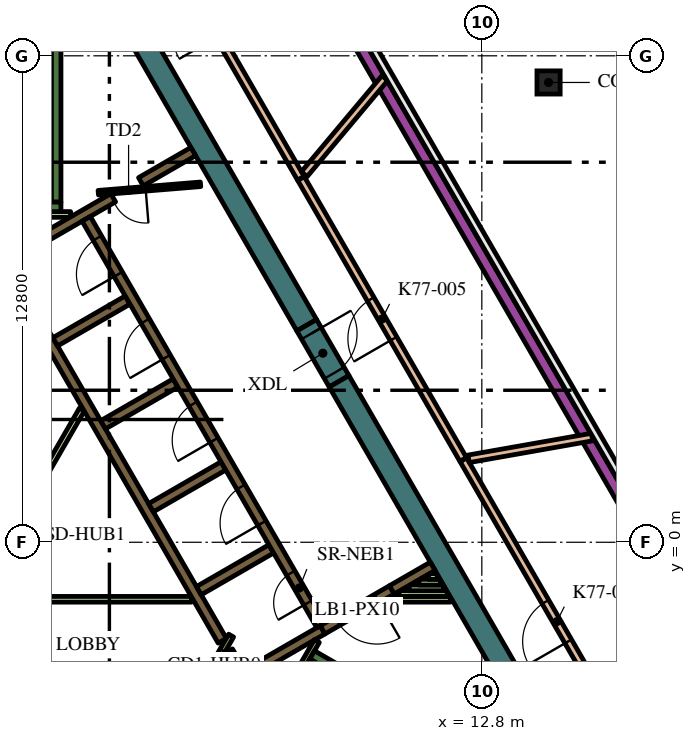
"""IFC4 building model, lengths in metres.
Left out: names, types, materials, properties, quantities, classifications, styles, units other than length and angle.
Written with IfcOpenShell. Run it as: python <this file> out.ifc"""

import sys

from ifc_helpers import new_model, si_unit, direction, frame, frame_2d, origin, origin_2d, place, context, subcontext, project, spatial, rectangle, hollow_circle, extrude, element, fill, save


model = new_model("IFC4")
c1 = context("Model", 3, precision=1e-05, world=origin(), true_north=direction((0.0, 1.0)))
c2 = subcontext(c1, "Body", "Model", "MODEL_VIEW")
j1 = project(units=[si_unit("LENGTHUNIT", "METRE"), si_unit("PLANEANGLEUNIT", "RADIAN")], contexts=[c1])
p1 = place(None, origin())
s1 = spatial("IfcSite", under=j1, at=p1, CompositionType="ELEMENT")
p2 = place(p1, origin())
s2 = spatial("IfcBuilding", under=s1, at=p2, CompositionType="ELEMENT")
p3 = place(p2, frame((0.0, 0.0, 331.8)))
s3 = spatial("IfcBuildingStorey", under=s2, at=p3, CompositionType="ELEMENT", Elevation=331.8)
p4 = place(p3, frame((14.556, 12.098, 0.0), z_axis=(0.0, 0.0, 1.0), x_axis=(1.0, 0.0, 0.0)))
e1 = element("IfcColumn", 1, at=p4, inside=s3, PredefinedType="COLUMN", context=c2, shape_type="SweptSolid", body=[
    extrude(hollow_circle(Radius=0.305, WallThickness=0.025, at=origin_2d()), origin(), (0.0, 0.0, 1.0), 4.2),
])
for number, where, z_axis, x_axis in (
    (2, (9.042, 4.239, 0.0), (0.0, 0.0, 1.0), (0.5, -0.866, 0.0)),
    (3, (1.989, 16.456, 0.0), (0.0, 0.0, 1.0), (0.5, -0.866, 0.0)),
):
    element("IfcWall", number, at=place(p3, frame(where, z_axis=z_axis, x_axis=x_axis)), inside=s3, PredefinedType="SOLIDWALL", context=c2, shape_type="SweptSolid", body=[
        extrude(rectangle(XDim=12.406, YDim=0.6, at=frame_2d((6.203, 0.0))), origin(), (0.0, 0.0, 1.0), 4.2),
    ])
p5 = place(p3, frame((8.334, -2.964, 0.0), z_axis=(0.0, 0.0, 1.0), x_axis=(0.866016039709, -0.500016218704, 0.0)))
e4 = element("IfcWall", 4, at=p5, inside=s3, PredefinedType="SOLIDWALL", context=c2, shape_type="SweptSolid", body=[
    extrude(rectangle(XDim=7.05, YDim=0.25, at=frame_2d((3.525, 0.0))), origin(), (0.0, 0.0, 1.0), 4.2),
])
p6 = place(p3, frame((8.168, -3.503, 0.0), z_axis=(0.0, 0.0, 1.0), x_axis=(0.49972245349, 0.866185586049, 0.0)))
e5 = element("IfcWall", 5, at=p6, inside=s3, PredefinedType="SOLIDWALL", context=c2, shape_type="SweptSolid", body=[
    extrude(rectangle(XDim=0.425, YDim=0.25, at=frame_2d((0.212, 0.0))), origin(), (0.0, 0.0, 1.0), 4.2),
])
p7 = place(p3, frame((1.6, 8.95, 0.0), z_axis=(0.0, 0.0, 1.0), x_axis=(0.0, 1.0, 0.0)))
e6 = element("IfcWall", 6, at=p7, inside=s3, PredefinedType="SOLIDWALL", context=c2, shape_type="SweptSolid", body=[
    extrude(rectangle(XDim=6.8, YDim=0.25, at=frame_2d((3.4, 0.0))), origin(), (0.0, 0.0, 1.0), 4.2),
])
p8 = place(p3, frame((1.05, 8.825, 0.0), z_axis=(0.0, 0.0, 1.0), x_axis=(1.0, 0.0, 0.0)))
e7 = element("IfcWall", 7, at=p8, inside=s3, PredefinedType="SOLIDWALL", context=c2, shape_type="SweptSolid", body=[
    extrude(rectangle(XDim=0.675, YDim=0.25, at=frame_2d((0.337, 0.0))), origin(), (0.0, 0.0, 1.0), 4.2),
])
p9 = place(p3, frame((8.61, -2.303, 0.0), z_axis=(0.0, 0.0, 1.0), x_axis=(-0.866056864386, -0.49994550468, 0.0)))
e8 = element("IfcWall", 8, at=p9, inside=s3, PredefinedType="SOLIDWALL", context=c2, shape_type="SweptSolid", body=[
    extrude(rectangle(XDim=2.621, YDim=0.25, at=frame_2d((1.311, 0.0))), origin(), (0.0, 0.0, 1.0), 4.2),
])
p10 = place(p3, frame((6.13, -2.867, 0.0), z_axis=(0.0, 0.0, 1.0), x_axis=(0.500160776593, -0.865932559475, 0.0)))
e9 = element("IfcWall", 9, at=p10, inside=s3, PredefinedType="SOLIDWALL", context=c2, shape_type="SweptSolid", body=[
    extrude(rectangle(XDim=0.627, YDim=0.25, at=frame_2d((0.313, 0.0))), origin(), (0.0, 0.0, 1.0), 4.2),
])
p11 = place(p3, frame((11.507, -0.631, 0.0), z_axis=(0.0, 0.0, 1.0), x_axis=(-0.866025525965, -0.499999788377, 0.0)))
e10 = element("IfcWall", 10, at=p11, inside=s3, PredefinedType="SOLIDWALL", context=c2, shape_type="SweptSolid", body=[
    extrude(rectangle(XDim=1.245, YDim=0.25, at=frame_2d((0.622, 0.0))), origin(), (0.0, 0.0, 1.0), 4.2),
])
p12 = place(p3, frame((3.1, 9.064, 0.0), z_axis=(0.0, 0.0, 1.0), x_axis=(-0.866033137035, -0.499986605379, 0.0)))
e11 = element("IfcWall", 11, at=p12, inside=s3, PredefinedType="SOLIDWALL", context=c2, shape_type="SweptSolid", body=[
    extrude(rectangle(XDim=3.467, YDim=0.25, at=frame_2d((1.733, 0.0))), origin(), (0.0, 0.0, 1.0), 4.2),
])
p13 = place(p3, frame((5.97, -2.591, 0.0), z_axis=(0.0, 0.0, 1.0), x_axis=(-0.499994469932, 0.866028596547, 0.0)))
e12 = element("IfcWall", 12, at=p13, inside=s3, PredefinedType="SOLIDWALL", context=c2, shape_type="SweptSolid", body=[
    extrude(rectangle(XDim=10.488, YDim=0.25, at=frame_2d((5.244, 0.0))), origin(), (0.0, 0.0, 1.0), 4.2),
])
p14 = place(p3, frame((1.574, 5.274, 0.0), z_axis=(0.0, 0.0, 1.0), x_axis=(0.866028486751, 0.499994660107, 0.0)))
e13 = element("IfcWall", 13, at=p14, inside=s3, PredefinedType="SOLIDWALL", context=c2, shape_type="SweptSolid", body=[
    extrude(rectangle(XDim=2.2, YDim=0.25, at=frame_2d((1.1, 0.0))), origin(), (0.0, 0.0, 1.0), 4.2),
])
for number, where, z_axis, x_axis in (
    (14, (2.834, 3.091, 0.0), (0.0, 0.0, 1.0), (0.866, 0.5, 0.0)),
    (15, (4.094, 0.909, 0.0), (0.0, 0.0, 1.0), (0.866, 0.5, 0.0)),
    (16, (5.354, -1.274, 0.0), (0.0, 0.0, 1.0), (0.866, 0.5, 0.0)),
):
    element("IfcWall", number, at=place(p3, frame(where, z_axis=z_axis, x_axis=x_axis)), inside=s3, PredefinedType="SOLIDWALL", context=c2, shape_type="SweptSolid", body=[
        extrude(rectangle(XDim=2.2, YDim=0.25, at=frame_2d((1.1, 0.0))), origin(), (0.0, 0.0, 1.0), 4.2),
    ])
p15 = place(p3, frame((3.83, 9.486, 0.0), z_axis=(0.0, 0.0, 1.0), x_axis=(0.865986202621, 0.500067892261, 0.0)))
e17 = element("IfcWall", 17, at=p15, inside=s3, PredefinedType="SOLIDWALL", context=c2, shape_type="SweptSolid", body=[
    extrude(rectangle(XDim=1.591, YDim=0.25, at=frame_2d((0.795, 0.0))), origin(), (0.0, 0.0, 1.0), 4.2),
])
p16 = place(p3, frame((1.05, 8.625, 0.0), z_axis=(0.0, 0.0, 1.0), x_axis=(1.0, 0.0, 0.0)))
e18 = element("IfcWall", 18, at=p16, inside=s3, PredefinedType="PARTITIONING", context=c2, shape_type="SweptSolid", body=[
    extrude(rectangle(XDim=0.929, YDim=0.15, at=frame_2d((0.464, 0.0))), origin(), (0.0, 0.0, 1.0), 3.45),
])
p17 = place(p3, frame((10.362, -1.5, 0.0), z_axis=(0.0, 0.0, 1.0), x_axis=(1.0, 0.0, 0.0)))
e19 = element("IfcWall", 19, at=p17, inside=s3, PredefinedType="PARTITIONING", context=c2, shape_type="SweptSolid", body=[
    extrude(rectangle(XDim=1.61, YDim=0.15, at=frame_2d((0.805, 0.0))), origin(), (0.0, 0.0, 1.0), 3.45),
])
p18 = place(p3, frame((10.622, -1.35, 0.0), z_axis=(0.0, 0.0, 1.0), x_axis=(1.0, 0.0, 0.0)))
e20 = element("IfcWall", 20, at=p18, inside=s3, PredefinedType="PARTITIONING", context=c2, shape_type="SweptSolid", body=[
    extrude(rectangle(XDim=1.263, YDim=0.15, at=frame_2d((0.632, 0.0))), origin(), (0.0, 0.0, 1.0), 3.45),
])
p19 = place(p3, frame((10.882, -1.2, 0.0), z_axis=(0.0, 0.0, 1.0), x_axis=(1.0, 0.0, 0.0)))
e21 = element("IfcWall", 21, at=p19, inside=s3, PredefinedType="PARTITIONING", context=c2, shape_type="SweptSolid", body=[
    extrude(rectangle(XDim=0.917, YDim=0.15, at=frame_2d((0.459, 0.0))), origin(), (0.0, 0.0, 1.0), 3.45),
])
p20 = place(p3, frame((11.712, -1.05, 0.0), z_axis=(0.0, 0.0, 1.0), x_axis=(-1.0, 0.0, 0.0)))
e22 = element("IfcWall", 22, at=p20, inside=s3, PredefinedType="PARTITIONING", context=c2, shape_type="SweptSolid", body=[
    extrude(rectangle(XDim=0.571, YDim=0.15, at=frame_2d((0.285, 0.0))), origin(), (0.0, 0.0, 1.0), 3.45),
])
p21 = place(p3, frame((11.401, -0.9, 0.0), z_axis=(0.0, 0.0, 1.0), x_axis=(1.0, 0.0, 0.0)))
e23 = element("IfcWall", 23, at=p21, inside=s3, PredefinedType="PARTITIONING", context=c2, shape_type="SweptSolid", body=[
    extrude(rectangle(XDim=0.224, YDim=0.15, at=frame_2d((0.112, 0.0))), origin(), (0.0, 0.0, 1.0), 3.45),
])
p22 = place(p3, frame((8.459, -2.599, 0.0), z_axis=(0.0, 0.0, 1.0), x_axis=(-0.500041054325, -0.866001699761, 0.0)))
e24 = element("IfcWall", 24, at=p22, inside=s3, PredefinedType="PARTITIONING", context=c2, shape_type="SweptSolid", body=[
    extrude(rectangle(XDim=0.929, YDim=0.15, at=frame_2d((0.464, 0.0))), origin(), (0.0, 0.0, 1.0), 4.2),
])
p23 = place(p3, frame((-4.2, -1.5, 0.0), z_axis=(0.0, 0.0, 1.0), x_axis=(1.0, 0.0, 0.0)))
e25 = element("IfcWall", 25, at=p23, inside=s3, PredefinedType="PARTITIONING", context=c2, shape_type="SweptSolid", body=[
    extrude(rectangle(XDim=9.359, YDim=0.15, at=frame_2d((4.68, 0.0))), origin(), (0.0, 0.0, 1.0), 3.45),
])
p24 = place(p3, frame((1.312, 1.822, 0.0), z_axis=(0.0, 0.0, 1.0), x_axis=(0.500003549559, 0.866023354436, 0.0)))
e26 = element("IfcWall", 26, at=p24, inside=s3, PredefinedType="PARTITIONING", context=c2, shape_type="SweptSolid", body=[
    extrude(rectangle(XDim=1.93, YDim=0.15, at=frame_2d((0.965, 0.0))), origin(), (0.0, 0.0, 1.0), 3.45),
])
p25 = place(p3, frame((8.565, -2.185, 0.0), z_axis=(0.0, 0.0, 1.0), x_axis=(-0.499997954832, 0.866026584559, 0.0)))
e27 = element("IfcWall", 27, at=p25, inside=s3, PredefinedType="SOLIDWALL", context=c2, shape_type="SweptSolid", body=[
    extrude(rectangle(XDim=12.35, YDim=0.25, at=frame_2d((6.175, 0.0))), origin(), (0.0, 0.0, 1.0), 4.2),
])
p26 = place(p25, frame((0.685, 0.0, 0.0)))
e28 = element("IfcOpeningElement", 28, at=p26, cuts=e27, PredefinedType="OPENING", context=c2, shape_type="SweptSolid", body=[
    extrude(rectangle(XDim=0.9, YDim=2.1, at=frame_2d((0.45, 1.05))), frame((0.0, 0.135, 0.0), z_axis=(0.0, -1.0, 0.0), x_axis=(1.0, 0.0, 0.0)), (0.0, 0.0, 1.0), 0.27),
])
p27 = place(p25, frame((3.105, 0.0, 0.0)))
e29 = element("IfcOpeningElement", 29, at=p27, cuts=e27, PredefinedType="OPENING", context=c2, shape_type="SweptSolid", body=[
    extrude(rectangle(XDim=1.1, YDim=2.1, at=frame_2d((0.55, 1.05))), frame((0.0, 0.135, 0.0), z_axis=(0.0, -1.0, 0.0), x_axis=(1.0, 0.0, 0.0)), (0.0, 0.0, 1.0), 0.27),
])
p28 = place(p25, frame((5.625, 0.0, 0.0)))
e30 = element("IfcOpeningElement", 30, at=p28, cuts=e27, PredefinedType="OPENING", context=c2, shape_type="SweptSolid", body=[
    extrude(rectangle(XDim=1.1, YDim=2.1, at=frame_2d((0.55, 1.05))), frame((0.0, 0.135, 0.0), z_axis=(0.0, -1.0, 0.0), x_axis=(1.0, 0.0, 0.0)), (0.0, 0.0, 1.0), 0.27),
])
p29 = place(p25, frame((8.145, 0.0, 0.0)))
e31 = element("IfcOpeningElement", 31, at=p29, cuts=e27, PredefinedType="OPENING", context=c2, shape_type="SweptSolid", body=[
    extrude(rectangle(XDim=1.1, YDim=2.1, at=frame_2d((0.55, 1.05))), frame((0.0, 0.135, 0.0), z_axis=(0.0, -1.0, 0.0), x_axis=(1.0, 0.0, 0.0)), (0.0, 0.0, 1.0), 0.27),
])
p30 = place(p25, frame((10.665, 0.0, 0.0)))
e32 = element("IfcOpeningElement", 32, at=p30, cuts=e27, PredefinedType="OPENING", context=c2, shape_type="SweptSolid", body=[
    extrude(rectangle(XDim=1.1, YDim=2.1, at=frame_2d((0.55, 1.05))), frame((0.0, 0.135, 0.0), z_axis=(0.0, -1.0, 0.0), x_axis=(1.0, 0.0, 0.0)), (0.0, 0.0, 1.0), 0.27),
])
p31 = place(p3, frame((5.398, 9.419, 0.0), z_axis=(0.0, 0.0, 1.0), x_axis=(-0.996653416376, -0.081743303248, 0.0)))
e33 = element("IfcWall", 33, at=p31, inside=s3, PredefinedType="PARTITIONING", context=c2, shape_type="SweptSolid", body=[
    extrude(rectangle(XDim=2.7, YDim=0.12, at=frame_2d((1.35, 0.0))), origin(), (0.0, 0.0, 1.0), 3.45),
])
p32 = place(p31, frame((1.45, 0.0, 0.0)))
e34 = element("IfcOpeningElement", 34, at=p32, cuts=e33, PredefinedType="OPENING", context=c2, shape_type="SweptSolid", body=[
    extrude(rectangle(XDim=0.9, YDim=2.1, at=frame_2d((0.45, 1.05))), frame((0.0, 0.07, 0.0), z_axis=(0.0, -1.0, 0.0), x_axis=(1.0, 0.0, 0.0)), (0.0, 0.0, 1.0), 0.14),
])
p33 = place(p3, frame((6.203, -2.456, 0.0), z_axis=(0.0, 0.0, 1.0), x_axis=(-0.500043961785, -0.866000020948, 0.0)))
e35 = element("IfcWall", 35, at=p33, inside=s3, PredefinedType="PARTITIONING", context=c2, shape_type="SweptSolid", body=[
    extrude(rectangle(XDim=1.95, YDim=0.15, at=frame_2d((0.975, 0.0))), origin(), (0.0, 0.0, 1.0), 4.2),
])
p34 = place(p33, frame((0.45, 0.0, 0.0)))
e36 = element("IfcOpeningElement", 36, at=p34, cuts=e35, PredefinedType="OPENING", context=c2, shape_type="SweptSolid", body=[
    extrude(rectangle(XDim=0.9, YDim=2.1, at=frame_2d((0.45, 1.05))), frame((0.0, 0.085, 0.0), z_axis=(0.0, -1.0, 0.0), x_axis=(1.0, 0.0, 0.0)), (0.0, 0.0, 1.0), 0.17),
])
p35 = place(p3, frame((10.429, -1.253, 0.0), z_axis=(0.0, 0.0, 1.0), x_axis=(-0.866009402589, -0.500027713859, 0.0)))
e37 = element("IfcWall", 37, at=p35, inside=s3, PredefinedType="SOLIDWALL", context=c2, shape_type="SweptSolid", body=[
    extrude(rectangle(XDim=2.1, YDim=0.25, at=frame_2d((1.05, 0.0))), origin(), (0.0, 0.0, 1.0), 4.2),
])
p36 = place(p35, frame((0.45, 0.0, 0.0)))
e38 = element("IfcOpeningElement", 38, at=p36, cuts=e37, PredefinedType="OPENING", context=c2, shape_type="SweptSolid", body=[
    extrude(rectangle(XDim=1.2, YDim=2.1, at=frame_2d((0.6, 1.05))), frame((0.0, 0.135, 0.0), z_axis=(0.0, -1.0, 0.0), x_axis=(1.0, 0.0, 0.0)), (0.0, 0.0, 1.0), 0.27),
])
p37 = place(p3, frame((8.192, 5.711, 0.0), z_axis=(0.0, 0.0, 1.0), x_axis=(0.500062241894, -0.865989465428, 0.0)))
e39 = element("IfcWall", 39, at=p37, inside=s3, PredefinedType="SOLIDWALL", context=c2, shape_type="SweptSolid", body=[
    extrude(rectangle(XDim=1.7, YDim=0.6, at=frame_2d((0.85, 0.0))), origin(), (0.0, 0.0, 1.0), 4.2),
])
p38 = place(p37, frame((0.25, 0.0, 0.0)))
e40 = element("IfcOpeningElement", 40, at=p38, cuts=e39, PredefinedType="OPENING", context=c2, shape_type="SweptSolid", body=[
    extrude(rectangle(XDim=1.2, YDim=2.1, at=frame_2d((0.6, 1.05))), frame((0.0, 0.31, 0.0), z_axis=(0.0, -1.0, 0.0), x_axis=(1.0, 0.0, 0.0)), (0.0, 0.0, 1.0), 0.62),
])
p39 = place(p3, frame((17.234, -6.35, 0.0), z_axis=(0.0, 0.0, 1.0), x_axis=(-0.500003092839, 0.866023618125, 0.0)))
e41 = element("IfcWall", 41, at=p39, inside=s3, PredefinedType="PARTITIONING", context=c2, shape_type="SweptSolid", body=[
    extrude(rectangle(XDim=9.84, YDim=0.2, at=frame_2d((4.92, 0.0))), origin(), (0.0, 0.0, 1.0), 3.45),
])
p40 = place(p39, frame((4.32, 0.0, 0.0)))
e42 = element("IfcOpeningElement", 42, at=p40, cuts=e41, PredefinedType="OPENING", context=c2, shape_type="SweptSolid", body=[
    extrude(rectangle(XDim=1.2, YDim=2.1, at=frame_2d((0.6, 1.05))), frame((0.0, 0.11, 0.0), z_axis=(0.0, -1.0, 0.0), x_axis=(1.0, 0.0, 0.0)), (0.0, 0.0, 1.0), 0.22),
])
p41 = place(p3, frame((8.038, 9.579, 0.0), z_axis=(0.0, 0.0, 1.0), x_axis=(-0.500003092839, 0.866023618125, 0.0)))
e43 = element("IfcWall", 43, at=p41, inside=s3, PredefinedType="PARTITIONING", context=c2, shape_type="SweptSolid", body=[
    extrude(rectangle(XDim=9.84, YDim=0.2, at=frame_2d((4.92, 0.0))), origin(), (0.0, 0.0, 1.0), 3.45),
])
p42 = place(p41, frame((4.32, 0.0, 0.0)))
e44 = element("IfcOpeningElement", 44, at=p42, cuts=e43, PredefinedType="OPENING", context=c2, shape_type="SweptSolid", body=[
    extrude(rectangle(XDim=1.2, YDim=2.1, at=frame_2d((0.6, 1.05))), frame((0.0, 0.11, 0.0), z_axis=(0.0, -1.0, 0.0), x_axis=(1.0, 0.0, 0.0)), (0.0, 0.0, 1.0), 0.22),
])
p43 = place(p3, frame((12.309, 2.18, 0.0), z_axis=(0.0, 0.0, 1.0), x_axis=(-0.499966798825, 0.866044571643, 0.0)))
e45 = element("IfcWall", 45, at=p43, inside=s3, PredefinedType="PARTITIONING", context=c2, shape_type="SweptSolid", body=[
    extrude(rectangle(XDim=8.534, YDim=0.2, at=frame_2d((4.267, 0.0))), origin(), (0.0, 0.0, 1.0), 3.45),
])
p44 = place(p43, frame((3.667, 0.0, 0.0)))
e46 = element("IfcOpeningElement", 46, at=p44, cuts=e45, PredefinedType="OPENING", context=c2, shape_type="SweptSolid", body=[
    extrude(rectangle(XDim=1.2, YDim=2.1, at=frame_2d((0.6, 1.05))), frame((0.0, 0.11, 0.0), z_axis=(0.0, -1.0, 0.0), x_axis=(1.0, 0.0, 0.0)), (0.0, 0.0, 1.0), 0.22),
])
p45 = place(p3, frame((12.452, 2.196, 0.0), z_axis=(0.0, 0.0, 1.0), x_axis=(0.984804409481, 0.173667138707, 0.0)))
e47 = element("IfcWall", 47, at=p45, inside=s3, PredefinedType="PARTITIONING", context=c2, shape_type="SweptSolid", body=[
    extrude(rectangle(XDim=3.299, YDim=0.2, at=frame_2d((1.65, 0.0))), origin(), (0.0, 0.0, 1.0), 3.45),
])
p46 = place(p3, frame((8.127, 9.686, 0.0), z_axis=(0.0, 0.0, 1.0), x_axis=(0.642778991378, 0.766051674656, 0.0)))
e48 = element("IfcWall", 48, at=p46, inside=s3, PredefinedType="PARTITIONING", context=c2, shape_type="SweptSolid", body=[
    extrude(rectangle(XDim=3.3, YDim=0.2, at=frame_2d((1.65, 0.0))), origin(), (0.0, 0.0, 1.0), 3.45),
])
p47 = place(p3, frame((18.181, -1.79, 0.0), z_axis=(0.0, 0.0, 1.0), x_axis=(-0.500002158106, 0.866024157798, 0.0)))
e49 = element("IfcWall", 49, at=p47, inside=s3, PredefinedType="SOLIDWALL", context=c2, shape_type="SweptSolid", body=[
    extrude(rectangle(XDim=21.282, YDim=0.3, at=frame_2d((10.641, 0.0))), origin(), (0.0, 0.0, 1.0), 3.45),
])
p48 = place(p26, origin())
e50 = element("IfcDoor", 50, at=p48, inside=s3, OperationType="SINGLE_SWING_LEFT", PredefinedType="DOOR", context=c2, shape_type="SweptSolid", body=[
    extrude(rectangle(XDim=0.9, YDim=2.1, at=frame_2d((0.45, 1.05))), frame((0.0, 0.025, 0.0), z_axis=(0.0, -1.0, 0.0), x_axis=(1.0, 0.0, 0.0)), (0.0, 0.0, 1.0), 0.05),
])
fill(e28, e50)
p49 = place(p27, origin())
e51 = element("IfcDoor", 51, at=p49, inside=s3, OperationType="DOUBLE_DOOR_SLIDING", PredefinedType="DOOR", context=c2, shape_type="SweptSolid", body=[
    extrude(rectangle(XDim=1.1, YDim=2.1, at=frame_2d((0.55, 1.05))), frame((0.0, 0.025, 0.0), z_axis=(0.0, -1.0, 0.0), x_axis=(1.0, 0.0, 0.0)), (0.0, 0.0, 1.0), 0.05),
])
fill(e29, e51)
p50 = place(p28, origin())
e52 = element("IfcDoor", 52, at=p50, inside=s3, OperationType="DOUBLE_DOOR_SLIDING", PredefinedType="DOOR", context=c2, shape_type="SweptSolid", body=[
    extrude(rectangle(XDim=1.1, YDim=2.1, at=frame_2d((0.55, 1.05))), frame((0.0, 0.025, 0.0), z_axis=(0.0, -1.0, 0.0), x_axis=(1.0, 0.0, 0.0)), (0.0, 0.0, 1.0), 0.05),
])
fill(e30, e52)
p51 = place(p29, origin())
e53 = element("IfcDoor", 53, at=p51, inside=s3, OperationType="DOUBLE_DOOR_SLIDING", PredefinedType="DOOR", context=c2, shape_type="SweptSolid", body=[
    extrude(rectangle(XDim=1.1, YDim=2.1, at=frame_2d((0.55, 1.05))), frame((0.0, 0.025, 0.0), z_axis=(0.0, -1.0, 0.0), x_axis=(1.0, 0.0, 0.0)), (0.0, 0.0, 1.0), 0.05),
])
fill(e31, e53)
p52 = place(p30, origin())
e54 = element("IfcDoor", 54, at=p52, inside=s3, OperationType="DOUBLE_DOOR_SLIDING", PredefinedType="DOOR", context=c2, shape_type="SweptSolid", body=[
    extrude(rectangle(XDim=1.1, YDim=2.1, at=frame_2d((0.55, 1.05))), frame((0.0, 0.025, 0.0), z_axis=(0.0, -1.0, 0.0), x_axis=(1.0, 0.0, 0.0)), (0.0, 0.0, 1.0), 0.05),
])
fill(e32, e54)
p53 = place(p32, origin())
e55 = element("IfcDoor", 55, at=p53, inside=s3, OperationType="SINGLE_SWING_LEFT", PredefinedType="DOOR", context=c2, shape_type="SweptSolid", body=[
    extrude(rectangle(XDim=0.9, YDim=2.1, at=frame_2d((0.45, 1.05))), frame((0.0, 0.025, 0.0), z_axis=(0.0, -1.0, 0.0), x_axis=(1.0, 0.0, 0.0)), (0.0, 0.0, 1.0), 0.05),
])
fill(e34, e55)
p54 = place(p34, origin())
e56 = element("IfcDoor", 56, at=p54, inside=s3, OperationType="SINGLE_SWING_LEFT", PredefinedType="DOOR", context=c2, shape_type="SweptSolid", body=[
    extrude(rectangle(XDim=0.9, YDim=2.1, at=frame_2d((0.45, 1.05))), frame((0.0, 0.025, 0.0), z_axis=(0.0, -1.0, 0.0), x_axis=(1.0, 0.0, 0.0)), (0.0, 0.0, 1.0), 0.05),
])
fill(e36, e56)
p55 = place(p36, origin())
e57 = element("IfcDoor", 57, at=p55, inside=s3, OperationType="SINGLE_SWING_LEFT", PredefinedType="DOOR", context=c2, shape_type="SweptSolid", body=[
    extrude(rectangle(XDim=1.2, YDim=2.1, at=frame_2d((0.6, 1.05))), frame((0.0, 0.025, 0.0), z_axis=(0.0, -1.0, 0.0), x_axis=(1.0, 0.0, 0.0)), (0.0, 0.0, 1.0), 0.05),
])
fill(e38, e57)
p56 = place(p38, origin())
e58 = element("IfcDoor", 58, at=p56, inside=s3, OperationType="SINGLE_SWING_LEFT", PredefinedType="DOOR", context=c2, shape_type="SweptSolid", body=[
    extrude(rectangle(XDim=1.2, YDim=2.1, at=frame_2d((0.6, 1.05))), frame((0.0, 0.025, 0.0), z_axis=(0.0, -1.0, 0.0), x_axis=(1.0, 0.0, 0.0)), (0.0, 0.0, 1.0), 0.05),
])
fill(e40, e58)
p57 = place(p40, origin())
e59 = element("IfcDoor", 59, at=p57, inside=s3, OperationType="SINGLE_SWING_RIGHT", PredefinedType="DOOR", context=c2, shape_type="SweptSolid", body=[
    extrude(rectangle(XDim=1.2, YDim=2.1, at=frame_2d((0.6, 1.05))), frame((0.0, 0.025, 0.0), z_axis=(0.0, -1.0, 0.0), x_axis=(1.0, 0.0, 0.0)), (0.0, 0.0, 1.0), 0.05),
])
fill(e42, e59)
p58 = place(p44, origin())
e60 = element("IfcDoor", 60, at=p58, inside=s3, OperationType="SINGLE_SWING_RIGHT", PredefinedType="DOOR", context=c2, shape_type="SweptSolid", body=[
    extrude(rectangle(XDim=1.2, YDim=2.1, at=frame_2d((0.6, 1.05))), frame((0.0, 0.025, 0.0), z_axis=(0.0, -1.0, 0.0), x_axis=(1.0, 0.0, 0.0)), (0.0, 0.0, 1.0), 0.05),
])
fill(e46, e60)
save(model, sys.argv[1])
